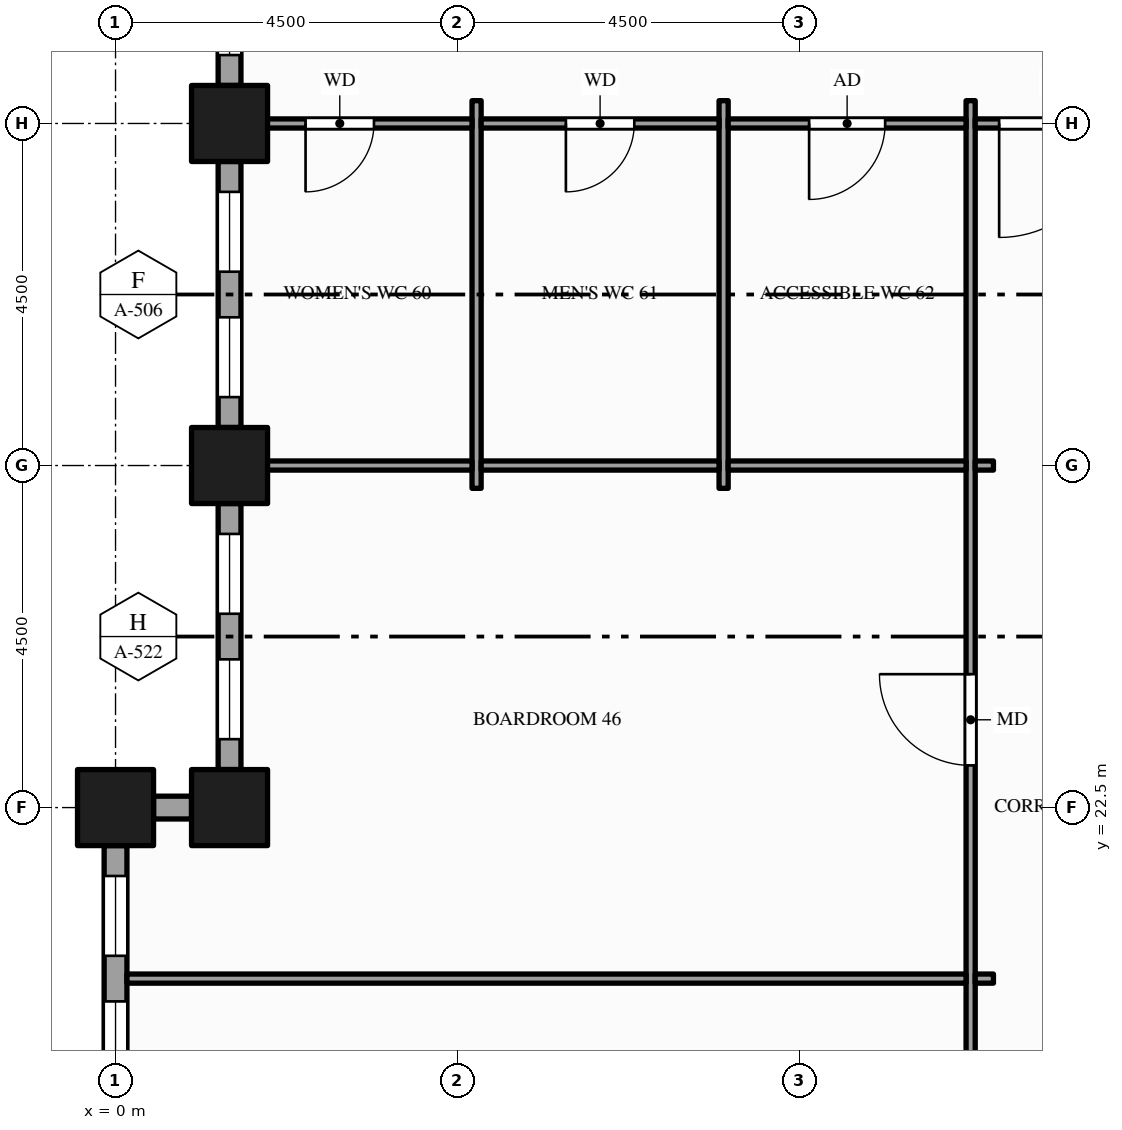
"""IFC4 building model, lengths in metres.
Left out: names, types, materials, properties, quantities, classifications, styles, units other than length and angle.
Written with IfcOpenShell. Run it as: python <this file> out.ifc"""

import sys

from ifc_helpers import new_model, si_unit, direction, frame, frame_2d, origin, origin_2d, place, context, subcontext, project, spatial, rectangle, hollow_rectangle, extrude, element, fill, save


model = new_model("IFC4")
c1 = context("Model", 3, precision=1e-05, world=origin(), true_north=direction((0.0, 1.0)))
c2 = subcontext(c1, "Body", "Model", "MODEL_VIEW")
j1 = project(units=[si_unit("LENGTHUNIT", "METRE"), si_unit("PLANEANGLEUNIT", "RADIAN")], contexts=[c1])
p1 = place(None, origin())
s1 = spatial("IfcSite", under=j1, at=p1, CompositionType="ELEMENT")
p2 = place(p1, origin())
s2 = spatial("IfcBuilding", under=s1, at=p2, CompositionType="ELEMENT")
p3 = place(p2, frame((0.0, 0.0, 83.0)))
s3 = spatial("IfcBuildingStorey", under=s2, at=p3, CompositionType="ELEMENT", Elevation=83.0)
for number, where, z_axis, x_axis in (
    (1, (0.0, 22.5, -0.15), (0.0, 0.0, 1.0), (1.0, 0.0, 0.0)),
    (2, (1.5, 22.5, -0.15), (0.0, 0.0, 1.0), (1.0, 0.0, 0.0)),
    (3, (1.5, 27.0, -0.15), (0.0, 0.0, 1.0), (1.0, 0.0, 0.0)),
    (4, (1.5, 31.5, -0.15), (0.0, 0.0, 1.0), (1.0, 0.0, 0.0)),
):
    element("IfcColumn", number, at=place(p3, frame(where, z_axis=z_axis, x_axis=x_axis)), inside=s3, PredefinedType="COLUMN", context=c2, shape_type="SweptSolid", body=[
        extrude(hollow_rectangle(XDim=1.0, YDim=1.0, WallThickness=0.05, at=origin_2d()), origin(), (0.0, 0.0, 1.0), 4.0),
    ])
p4 = place(p3, frame((1.5, 36.0, 0.0), z_axis=(0.0, 0.0, 1.0), x_axis=(0.0, -1.0, 0.0)))
e5 = element("IfcWall", 5, at=p4, inside=s3, PredefinedType="STANDARD", context=c2, shape_type="SweptSolid", body=[
    extrude(rectangle(XDim=4.0, YDim=0.3, at=frame_2d((2.0, 0.0))), origin(), (0.0, 0.0, 1.0), 3.154),
])
p5 = place(p4, frame((0.4, 0.0, 0.9)))
e6 = element("IfcOpeningElement", 6, at=p5, cuts=e5, PredefinedType="OPENING", context=c2, shape_type="SweptSolid", body=[
    extrude(rectangle(XDim=1.55, YDim=2.0, at=frame_2d((0.775, 1.0))), frame((0.0, 0.16, 0.0), z_axis=(0.0, -1.0, 0.0), x_axis=(1.0, 0.0, 0.0)), (0.0, 0.0, 1.0), 0.32),
])
p6 = place(p4, frame((2.55, 0.0, 0.9)))
e7 = element("IfcOpeningElement", 7, at=p6, cuts=e5, PredefinedType="OPENING", context=c2, shape_type="SweptSolid", body=[
    extrude(rectangle(XDim=1.05, YDim=2.0, at=frame_2d((0.525, 1.0))), frame((0.0, 0.16, 0.0), z_axis=(0.0, -1.0, 0.0), x_axis=(1.0, 0.0, 0.0)), (0.0, 0.0, 1.0), 0.32),
])
p7 = place(p3, frame((1.5, 31.0, 0.0), z_axis=(0.0, 0.0, 1.0), x_axis=(0.0, -1.0, 0.0)))
e8 = element("IfcWall", 8, at=p7, inside=s3, PredefinedType="STANDARD", context=c2, shape_type="SweptSolid", body=[
    extrude(rectangle(XDim=3.5, YDim=0.3, at=frame_2d((1.75, 0.0))), origin(), (0.0, 0.0, 1.0), 3.154),
])
p8 = place(p7, frame((0.4, 0.0, 0.9)))
e9 = element("IfcOpeningElement", 9, at=p8, cuts=e8, PredefinedType="OPENING", context=c2, shape_type="SweptSolid", body=[
    extrude(rectangle(XDim=1.05, YDim=2.0, at=frame_2d((0.525, 1.0))), frame((0.0, 0.16, 0.0), z_axis=(0.0, -1.0, 0.0), x_axis=(1.0, 0.0, 0.0)), (0.0, 0.0, 1.0), 0.32),
])
p9 = place(p7, frame((2.05, 0.0, 0.9)))
e10 = element("IfcOpeningElement", 10, at=p9, cuts=e8, PredefinedType="OPENING", context=c2, shape_type="SweptSolid", body=[
    extrude(rectangle(XDim=1.05, YDim=2.0, at=frame_2d((0.525, 1.0))), frame((0.0, 0.16, 0.0), z_axis=(0.0, -1.0, 0.0), x_axis=(1.0, 0.0, 0.0)), (0.0, 0.0, 1.0), 0.32),
])
p10 = place(p3, frame((1.5, 26.5, 0.0), z_axis=(0.0, 0.0, 1.0), x_axis=(0.0, -1.0, 0.0)))
e11 = element("IfcWall", 11, at=p10, inside=s3, PredefinedType="STANDARD", context=c2, shape_type="SweptSolid", body=[
    extrude(rectangle(XDim=3.5, YDim=0.3, at=frame_2d((1.75, 0.0))), origin(), (0.0, 0.0, 1.0), 3.154),
])
p11 = place(p10, frame((0.4, 0.0, 0.9)))
e12 = element("IfcOpeningElement", 12, at=p11, cuts=e11, PredefinedType="OPENING", context=c2, shape_type="SweptSolid", body=[
    extrude(rectangle(XDim=1.05, YDim=2.0, at=frame_2d((0.525, 1.0))), frame((0.0, 0.16, 0.0), z_axis=(0.0, -1.0, 0.0), x_axis=(1.0, 0.0, 0.0)), (0.0, 0.0, 1.0), 0.32),
])
p12 = place(p10, frame((2.05, 0.0, 0.9)))
e13 = element("IfcOpeningElement", 13, at=p12, cuts=e11, PredefinedType="OPENING", context=c2, shape_type="SweptSolid", body=[
    extrude(rectangle(XDim=1.05, YDim=2.0, at=frame_2d((0.525, 1.0))), frame((0.0, 0.16, 0.0), z_axis=(0.0, -1.0, 0.0), x_axis=(1.0, 0.0, 0.0)), (0.0, 0.0, 1.0), 0.32),
])
p13 = place(p3, frame((1.0, 22.5, 0.0), z_axis=(0.0, 0.0, 1.0), x_axis=(-1.0, 0.0, 0.0)))
e14 = element("IfcWall", 14, at=p13, inside=s3, PredefinedType="STANDARD", context=c2, shape_type="SweptSolid", body=[
    extrude(rectangle(XDim=0.5, YDim=0.3, at=frame_2d((0.25, 0.0))), origin(), (0.0, 0.0, 1.0), 3.154),
])
p14 = place(p3, frame((0.0, 22.0, 0.0), z_axis=(0.0, 0.0, 1.0), x_axis=(0.0, -1.0, 0.0)))
e15 = element("IfcWall", 15, at=p14, inside=s3, PredefinedType="STANDARD", context=c2, shape_type="SweptSolid", body=[
    extrude(rectangle(XDim=3.5, YDim=0.3, at=frame_2d((1.75, 0.0))), origin(), (0.0, 0.0, 1.0), 3.154),
])
p15 = place(p14, frame((0.4, 0.0, 0.9)))
e16 = element("IfcOpeningElement", 16, at=p15, cuts=e15, PredefinedType="OPENING", context=c2, shape_type="SweptSolid", body=[
    extrude(rectangle(XDim=1.05, YDim=2.0, at=frame_2d((0.525, 1.0))), frame((0.0, 0.16, 0.0), z_axis=(0.0, -1.0, 0.0), x_axis=(1.0, 0.0, 0.0)), (0.0, 0.0, 1.0), 0.32),
])
p16 = place(p14, frame((2.05, 0.0, 0.9)))
e17 = element("IfcOpeningElement", 17, at=p16, cuts=e15, PredefinedType="OPENING", context=c2, shape_type="SweptSolid", body=[
    extrude(rectangle(XDim=1.05, YDim=2.0, at=frame_2d((0.525, 1.0))), frame((0.0, 0.16, 0.0), z_axis=(0.0, -1.0, 0.0), x_axis=(1.0, 0.0, 0.0)), (0.0, 0.0, 1.0), 0.32),
])
for number, where, z_axis, x_axis in (
    (18, (4.75, 26.7, 0.0), (0.0, 0.0, 1.0), (0.0, 1.0, 0.0)),
    (19, (8.0, 26.7, 0.0), (0.0, 0.0, 1.0), (0.0, 1.0, 0.0)),
):
    element("IfcWall", number, at=place(p3, frame(where, z_axis=z_axis, x_axis=x_axis)), inside=s3, PredefinedType="PARTITIONING", context=c2, shape_type="SweptSolid", body=[
        extrude(rectangle(XDim=5.1, YDim=0.12, at=frame_2d((2.55, 0.0))), origin(), (0.0, 0.0, 1.0), 3.85),
    ])
p17 = place(p3, frame((11.25, 13.2, 0.0), z_axis=(0.0, 0.0, 1.0), x_axis=(0.0, 1.0, 0.0)))
e20 = element("IfcWall", 20, at=p17, inside=s3, PredefinedType="PARTITIONING", context=c2, shape_type="SweptSolid", body=[
    extrude(rectangle(XDim=18.6, YDim=0.12, at=frame_2d((9.3, 0.0))), origin(), (0.0, 0.0, 1.0), 2.6),
])
p18 = place(p17, frame((3.175, 0.0, 0.0)))
e21 = element("IfcOpeningElement", 21, at=p18, cuts=e20, PredefinedType="OPENING", context=c2, shape_type="SweptSolid", body=[
    extrude(rectangle(XDim=1.0, YDim=2.1, at=frame_2d((0.5, 1.05))), frame((0.0, 0.07, 0.0), z_axis=(0.0, -1.0, 0.0), x_axis=(1.0, 0.0, 0.0)), (0.0, 0.0, 1.0), 0.14),
])
p19 = place(p17, frame((9.855, 0.0, 0.0)))
e22 = element("IfcOpeningElement", 22, at=p19, cuts=e20, PredefinedType="OPENING", context=c2, shape_type="SweptSolid", body=[
    extrude(rectangle(XDim=1.2, YDim=2.1, at=frame_2d((0.6, 1.05))), frame((0.0, 0.07, 0.0), z_axis=(0.0, -1.0, 0.0), x_axis=(1.0, 0.0, 0.0)), (0.0, 0.0, 1.0), 0.14),
])
p20 = place(p3, frame((0.15, 20.25, 0.0), z_axis=(0.0, 0.0, 1.0), x_axis=(1.0, 0.0, 0.0)))
e23 = element("IfcWall", 23, at=p20, inside=s3, PredefinedType="PARTITIONING", context=c2, shape_type="SweptSolid", body=[
    extrude(rectangle(XDim=11.04, YDim=0.12, at=frame_2d((5.52, 0.0))), origin(), (0.0, 0.0, 1.0), 2.938),
])
p21 = place(p3, frame((11.31, 20.25, 0.0), z_axis=(0.0, 0.0, 1.0), x_axis=(1.0, 0.0, 0.0)))
e24 = element("IfcWall", 24, at=p21, inside=s3, PredefinedType="PARTITIONING", context=c2, shape_type="SweptSolid", body=[
    extrude(rectangle(XDim=0.24, YDim=0.12, at=frame_2d((0.12, 0.0))), origin(), (0.0, 0.0, 1.0), 2.938),
])
p22 = place(p3, frame((1.65, 27.0, 0.0), z_axis=(0.0, 0.0, 1.0), x_axis=(1.0, 0.0, 0.0)))
e25 = element("IfcWall", 25, at=p22, inside=s3, PredefinedType="PARTITIONING", context=c2, shape_type="SweptSolid", body=[
    extrude(rectangle(XDim=3.04, YDim=0.12, at=frame_2d((1.52, 0.0))), origin(), (0.0, 0.0, 1.0), 2.938),
])
for number, where, z_axis, x_axis in (
    (26, (4.81, 27.0, 0.0), (0.0, 0.0, 1.0), (1.0, 0.0, 0.0)),
    (27, (8.06, 27.0, 0.0), (0.0, 0.0, 1.0), (1.0, 0.0, 0.0)),
):
    element("IfcWall", number, at=place(p3, frame(where, z_axis=z_axis, x_axis=x_axis)), inside=s3, PredefinedType="PARTITIONING", context=c2, shape_type="SweptSolid", body=[
        extrude(rectangle(XDim=3.13, YDim=0.12, at=frame_2d((1.565, 0.0))), origin(), (0.0, 0.0, 1.0), 2.938),
    ])
p23 = place(p3, frame((11.31, 27.0, 0.0), z_axis=(0.0, 0.0, 1.0), x_axis=(1.0, 0.0, 0.0)))
e28 = element("IfcWall", 28, at=p23, inside=s3, PredefinedType="PARTITIONING", context=c2, shape_type="SweptSolid", body=[
    extrude(rectangle(XDim=0.24, YDim=0.12, at=frame_2d((0.12, 0.0))), origin(), (0.0, 0.0, 1.0), 2.938),
])
p24 = place(p3, frame((1.65, 31.5, 0.0), z_axis=(0.0, 0.0, 1.0), x_axis=(1.0, 0.0, 0.0)))
e29 = element("IfcWall", 29, at=p24, inside=s3, PredefinedType="PARTITIONING", context=c2, shape_type="SweptSolid", body=[
    extrude(rectangle(XDim=3.04, YDim=0.12, at=frame_2d((1.52, 0.0))), origin(), (0.0, 0.0, 1.0), 2.938),
])
p25 = place(p24, frame((0.85, 0.0, 0.0)))
e30 = element("IfcOpeningElement", 30, at=p25, cuts=e29, PredefinedType="OPENING", context=c2, shape_type="SweptSolid", body=[
    extrude(rectangle(XDim=0.9, YDim=2.1, at=frame_2d((0.45, 1.05))), frame((0.0, 0.07, 0.0), z_axis=(0.0, -1.0, 0.0), x_axis=(1.0, 0.0, 0.0)), (0.0, 0.0, 1.0), 0.14),
])
p26 = place(p3, frame((4.81, 31.5, 0.0), z_axis=(0.0, 0.0, 1.0), x_axis=(1.0, 0.0, 0.0)))
e31 = element("IfcWall", 31, at=p26, inside=s3, PredefinedType="PARTITIONING", context=c2, shape_type="SweptSolid", body=[
    extrude(rectangle(XDim=3.13, YDim=0.12, at=frame_2d((1.565, 0.0))), origin(), (0.0, 0.0, 1.0), 2.938),
])
p27 = place(p26, frame((1.115, 0.0, 0.0)))
e32 = element("IfcOpeningElement", 32, at=p27, cuts=e31, PredefinedType="OPENING", context=c2, shape_type="SweptSolid", body=[
    extrude(rectangle(XDim=0.9, YDim=2.1, at=frame_2d((0.45, 1.05))), frame((0.0, 0.07, 0.0), z_axis=(0.0, -1.0, 0.0), x_axis=(1.0, 0.0, 0.0)), (0.0, 0.0, 1.0), 0.14),
])
p28 = place(p3, frame((8.06, 31.5, 0.0), z_axis=(0.0, 0.0, 1.0), x_axis=(1.0, 0.0, 0.0)))
e33 = element("IfcWall", 33, at=p28, inside=s3, PredefinedType="PARTITIONING", context=c2, shape_type="SweptSolid", body=[
    extrude(rectangle(XDim=3.13, YDim=0.12, at=frame_2d((1.565, 0.0))), origin(), (0.0, 0.0, 1.0), 2.938),
])
p29 = place(p28, frame((1.065, 0.0, 0.0)))
e34 = element("IfcOpeningElement", 34, at=p29, cuts=e33, PredefinedType="OPENING", context=c2, shape_type="SweptSolid", body=[
    extrude(rectangle(XDim=1.0, YDim=2.1, at=frame_2d((0.5, 1.05))), frame((0.0, 0.07, 0.0), z_axis=(0.0, -1.0, 0.0), x_axis=(1.0, 0.0, 0.0)), (0.0, 0.0, 1.0), 0.14),
])
p30 = place(p3, frame((11.31, 31.5, 0.0), z_axis=(0.0, 0.0, 1.0), x_axis=(1.0, 0.0, 0.0)))
e35 = element("IfcWall", 35, at=p30, inside=s3, PredefinedType="PARTITIONING", context=c2, shape_type="SweptSolid", body=[
    extrude(rectangle(XDim=2.13, YDim=0.12, at=frame_2d((1.065, 0.0))), origin(), (0.0, 0.0, 1.0), 2.938),
])
p31 = place(p30, frame((0.315, 0.0, 0.0)))
e36 = element("IfcOpeningElement", 36, at=p31, cuts=e35, PredefinedType="OPENING", context=c2, shape_type="SweptSolid", body=[
    extrude(rectangle(XDim=1.5, YDim=2.1, at=frame_2d((0.75, 1.05))), frame((0.0, 0.07, 0.0), z_axis=(0.0, -1.0, 0.0), x_axis=(1.0, 0.0, 0.0)), (0.0, 0.0, 1.0), 0.14),
])
p32 = place(p6, origin())
e37 = element("IfcWindow", 37, at=p32, inside=s3, PartitioningType="SINGLE_PANEL", PredefinedType="WINDOW", context=c2, shape_type="SweptSolid", body=[
    extrude(rectangle(XDim=1.05, YDim=2.0, at=frame_2d((0.525, 1.0))), frame((0.0, 0.03, 0.0), z_axis=(0.0, -1.0, 0.0), x_axis=(1.0, 0.0, 0.0)), (0.0, 0.0, 1.0), 0.06),
])
fill(e7, e37)
p33 = place(p8, origin())
e38 = element("IfcWindow", 38, at=p33, inside=s3, PartitioningType="SINGLE_PANEL", PredefinedType="WINDOW", context=c2, shape_type="SweptSolid", body=[
    extrude(rectangle(XDim=1.05, YDim=2.0, at=frame_2d((0.525, 1.0))), frame((0.0, 0.03, 0.0), z_axis=(0.0, -1.0, 0.0), x_axis=(1.0, 0.0, 0.0)), (0.0, 0.0, 1.0), 0.06),
])
fill(e9, e38)
p34 = place(p9, origin())
e39 = element("IfcWindow", 39, at=p34, inside=s3, PartitioningType="SINGLE_PANEL", PredefinedType="WINDOW", context=c2, shape_type="SweptSolid", body=[
    extrude(rectangle(XDim=1.05, YDim=2.0, at=frame_2d((0.525, 1.0))), frame((0.0, 0.03, 0.0), z_axis=(0.0, -1.0, 0.0), x_axis=(1.0, 0.0, 0.0)), (0.0, 0.0, 1.0), 0.06),
])
fill(e10, e39)
p35 = place(p11, origin())
e40 = element("IfcWindow", 40, at=p35, inside=s3, PartitioningType="SINGLE_PANEL", PredefinedType="WINDOW", context=c2, shape_type="SweptSolid", body=[
    extrude(rectangle(XDim=1.05, YDim=2.0, at=frame_2d((0.525, 1.0))), frame((0.0, 0.03, 0.0), z_axis=(0.0, -1.0, 0.0), x_axis=(1.0, 0.0, 0.0)), (0.0, 0.0, 1.0), 0.06),
])
fill(e12, e40)
p36 = place(p12, origin())
e41 = element("IfcWindow", 41, at=p36, inside=s3, PartitioningType="SINGLE_PANEL", PredefinedType="WINDOW", context=c2, shape_type="SweptSolid", body=[
    extrude(rectangle(XDim=1.05, YDim=2.0, at=frame_2d((0.525, 1.0))), frame((0.0, 0.03, 0.0), z_axis=(0.0, -1.0, 0.0), x_axis=(1.0, 0.0, 0.0)), (0.0, 0.0, 1.0), 0.06),
])
fill(e13, e41)
p37 = place(p15, origin())
e42 = element("IfcWindow", 42, at=p37, inside=s3, PartitioningType="SINGLE_PANEL", PredefinedType="WINDOW", context=c2, shape_type="SweptSolid", body=[
    extrude(rectangle(XDim=1.05, YDim=2.0, at=frame_2d((0.525, 1.0))), frame((0.0, 0.03, 0.0), z_axis=(0.0, -1.0, 0.0), x_axis=(1.0, 0.0, 0.0)), (0.0, 0.0, 1.0), 0.06),
])
fill(e16, e42)
p38 = place(p16, origin())
e43 = element("IfcWindow", 43, at=p38, inside=s3, PartitioningType="SINGLE_PANEL", PredefinedType="WINDOW", context=c2, shape_type="SweptSolid", body=[
    extrude(rectangle(XDim=1.05, YDim=2.0, at=frame_2d((0.525, 1.0))), frame((0.0, 0.03, 0.0), z_axis=(0.0, -1.0, 0.0), x_axis=(1.0, 0.0, 0.0)), (0.0, 0.0, 1.0), 0.06),
])
fill(e17, e43)
p39 = place(p31, origin())
e44 = element("IfcDoor", 44, at=p39, inside=s3, OperationType="SINGLE_SWING_LEFT", PredefinedType="DOOR", context=c2, shape_type="SweptSolid", body=[
    extrude(rectangle(XDim=1.5, YDim=2.1, at=frame_2d((0.75, 1.05))), frame((0.0, 0.025, 0.0), z_axis=(0.0, -1.0, 0.0), x_axis=(1.0, 0.0, 0.0)), (0.0, 0.0, 1.0), 0.05),
])
fill(e36, e44)
p40 = place(p19, origin())
e45 = element("IfcDoor", 45, at=p40, inside=s3, OperationType="SINGLE_SWING_RIGHT", PredefinedType="DOOR", context=c2, shape_type="SweptSolid", body=[
    extrude(rectangle(XDim=1.2, YDim=2.1, at=frame_2d((0.6, 1.05))), frame((0.0, 0.025, 0.0), z_axis=(0.0, -1.0, 0.0), x_axis=(1.0, 0.0, 0.0)), (0.0, 0.0, 1.0), 0.05),
])
fill(e22, e45)
p41 = place(p25, origin())
e46 = element("IfcDoor", 46, at=p41, inside=s3, OperationType="SINGLE_SWING_LEFT", PredefinedType="DOOR", context=c2, shape_type="SweptSolid", body=[
    extrude(rectangle(XDim=0.9, YDim=2.1, at=frame_2d((0.45, 1.05))), frame((0.0, 0.025, 0.0), z_axis=(0.0, -1.0, 0.0), x_axis=(1.0, 0.0, 0.0)), (0.0, 0.0, 1.0), 0.05),
])
fill(e30, e46)
p42 = place(p27, origin())
e47 = element("IfcDoor", 47, at=p42, inside=s3, OperationType="SINGLE_SWING_LEFT", PredefinedType="DOOR", context=c2, shape_type="SweptSolid", body=[
    extrude(rectangle(XDim=0.9, YDim=2.1, at=frame_2d((0.45, 1.05))), frame((0.0, 0.025, 0.0), z_axis=(0.0, -1.0, 0.0), x_axis=(1.0, 0.0, 0.0)), (0.0, 0.0, 1.0), 0.05),
])
fill(e32, e47)
p43 = place(p29, origin())
e48 = element("IfcDoor", 48, at=p43, inside=s3, OperationType="SINGLE_SWING_LEFT", PredefinedType="DOOR", context=c2, shape_type="SweptSolid", body=[
    extrude(rectangle(XDim=1.0, YDim=2.1, at=frame_2d((0.5, 1.05))), frame((0.0, 0.025, 0.0), z_axis=(0.0, -1.0, 0.0), x_axis=(1.0, 0.0, 0.0)), (0.0, 0.0, 1.0), 0.05),
])
fill(e34, e48)
save(model, sys.argv[1])
